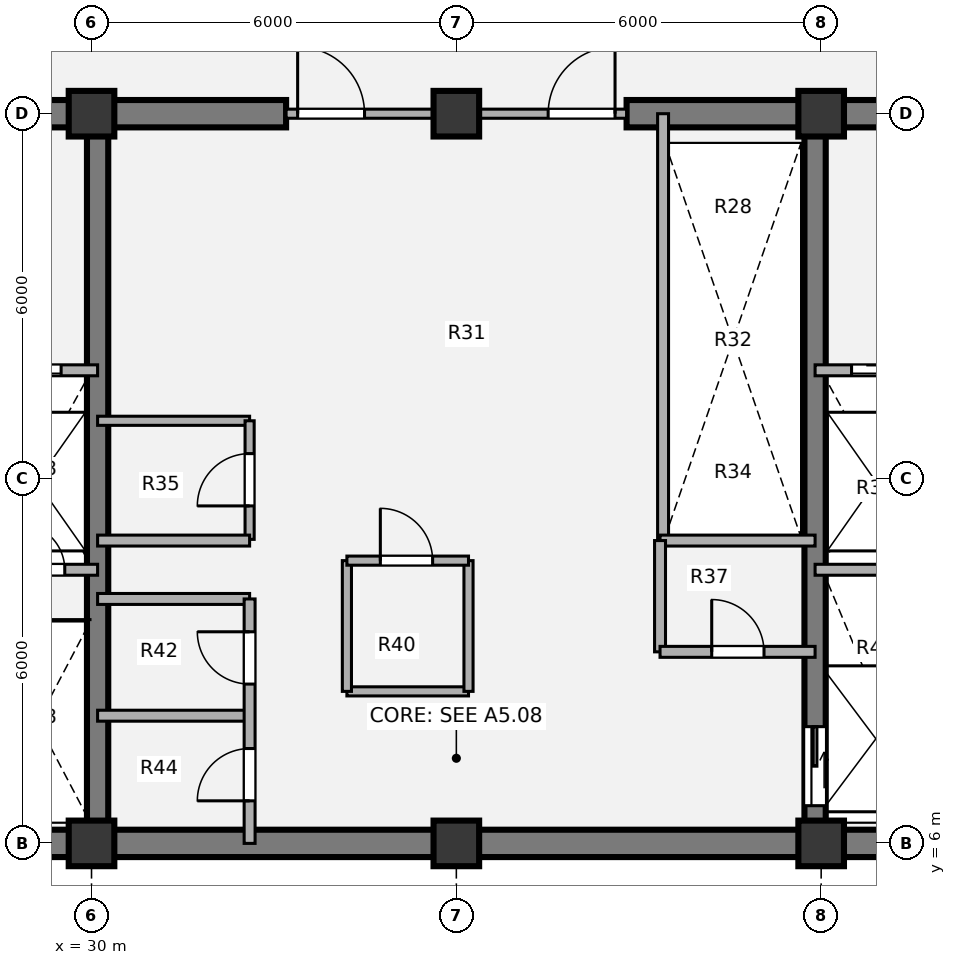
"""IFC4 building model, lengths in metres.
Left out: names, types, materials, properties, quantities, classifications, styles, units other than length and angle.
Written with IfcOpenShell. Run it as: python <this file> out.ifc"""

import sys

from ifc_helpers import new_model, si_unit, direction, frame, frame_2d, origin, origin_2d, place, context, subcontext, project, spatial, rectangle, extrude, source, transform, mapped, element, fill, save


model = new_model("IFC4")
c1 = context("Model", 3, precision=1e-05, world=origin(), true_north=direction((0.0, 1.0)))
c2 = subcontext(c1, "Body", "Model", "MODEL_VIEW")
j1 = project(units=[si_unit("LENGTHUNIT", "METRE"), si_unit("PLANEANGLEUNIT", "RADIAN")], contexts=[c1])
p1 = place(None, origin())
s1 = spatial("IfcSite", under=j1, at=p1, CompositionType="ELEMENT")
p2 = place(p1, origin())
s2 = spatial("IfcBuilding", under=s1, at=p2, CompositionType="ELEMENT")
p3 = place(p2, frame((0.0, 0.0, 171.54)))
s3 = spatial("IfcBuildingStorey", under=s2, at=p3, CompositionType="ELEMENT", Elevation=171.54)
m1 = source(origin(), c2, "Body", "SweptSolid", [
    extrude(rectangle(XDim=0.75, YDim=0.75, at=origin_2d()), origin(), (0.0, 0.0, 1.0), 3.78),
])
for number, where, z_axis, x_axis in (
    (1, (30.0, 6.0, 0.0), (0.0, 0.0, 1.0), (1.0, 0.0, 0.0)),
    (2, (36.0, 6.0, 0.0), (0.0, 0.0, 1.0), (1.0, 0.0, 0.0)),
    (3, (42.0, 6.0, 0.0), (0.0, 0.0, 1.0), (1.0, 0.0, 0.0)),
    (4, (30.0, 18.0, 0.0), (0.0, 0.0, 1.0), (1.0, 0.0, 0.0)),
    (5, (36.0, 18.0, 0.0), (0.0, 0.0, 1.0), (1.0, 0.0, 0.0)),
    (6, (42.0, 18.0, 0.0), (0.0, 0.0, 1.0), (1.0, 0.0, 0.0)),
):
    element("IfcColumn", number, at=place(p3, frame(where, z_axis=z_axis, x_axis=x_axis)), inside=s3, PredefinedType="COLUMN", context=c2, shape_type="MappedRepresentation", body=[
        mapped(m1, transform((0.0, 0.0, 0.0), x_axis=(1.0, 0.0, 0.0), y_axis=(0.0, 1.0, 0.0), z_axis=(0.0, 0.0, 1.0), scale=1.0)),
    ])
p4 = place(p3, frame((48.225, 6.0, 0.0), z_axis=(0.0, 0.0, 1.0), x_axis=(-1.0, 0.0, 0.0)))
e7 = element("IfcWall", 7, at=p4, inside=s3, PredefinedType="SHEAR", context=c2, shape_type="SweptSolid", body=[
    extrude(rectangle(XDim=24.45, YDim=0.45, at=frame_2d((12.225, 0.0))), origin(), (0.0, 0.0, 1.0), 3.78),
])
p5 = place(p3, frame((23.775, 18.0, 0.0), z_axis=(0.0, 0.0, 1.0), x_axis=(1.0, 0.0, 0.0)))
e8 = element("IfcWall", 8, at=p5, inside=s3, PredefinedType="SHEAR", context=c2, shape_type="SweptSolid", body=[
    extrude(rectangle(XDim=9.425, YDim=0.45, at=frame_2d((4.712, 0.0))), origin(), (0.0, 0.0, 1.0), 3.78),
])
p6 = place(p5, frame((2.95, 0.0, 0.0)))
e9 = element("IfcOpeningElement", 9, at=p6, cuts=e8, PredefinedType="OPENING", context=c2, shape_type="SweptSolid", body=[
    extrude(rectangle(XDim=1.1, YDim=2.1, at=origin_2d()), frame((0.55, 0.235, 1.05), z_axis=(0.0, -1.0, 0.0), x_axis=(1.0, 0.0, 0.0)), (0.0, 0.0, 1.0), 0.47),
])
p7 = place(p3, frame((38.8, 18.0, 0.0), z_axis=(0.0, 0.0, 1.0), x_axis=(1.0, 0.0, 0.0)))
e10 = element("IfcWall", 10, at=p7, inside=s3, PredefinedType="SHEAR", context=c2, shape_type="SweptSolid", body=[
    extrude(rectangle(XDim=9.425, YDim=0.45, at=frame_2d((4.712, 0.0))), origin(), (0.0, 0.0, 1.0), 3.78),
])
p8 = place(p7, frame((5.45, 0.0, 0.0)))
e11 = element("IfcOpeningElement", 11, at=p8, cuts=e10, PredefinedType="OPENING", context=c2, shape_type="SweptSolid", body=[
    extrude(rectangle(XDim=1.1, YDim=2.1, at=origin_2d()), frame((0.55, 0.235, 1.05), z_axis=(0.0, -1.0, 0.0), x_axis=(1.0, 0.0, 0.0)), (0.0, 0.0, 1.0), 0.47),
])
p9 = place(p3, frame((30.1, 6.0, 0.0), z_axis=(0.0, 0.0, 1.0), x_axis=(0.0, 1.0, 0.0)))
e12 = element("IfcWall", 12, at=p9, inside=s3, PredefinedType="SHEAR", context=c2, shape_type="SweptSolid", body=[
    extrude(rectangle(XDim=12.0, YDim=0.35, at=frame_2d((6.0, 0.0))), origin(), (0.0, 0.0, 1.0), 3.78),
])
p10 = place(p3, frame((41.9, 18.0, 0.0), z_axis=(0.0, 0.0, 1.0), x_axis=(0.0, -1.0, 0.0)))
e13 = element("IfcWall", 13, at=p10, inside=s3, PredefinedType="SHEAR", context=c2, shape_type="SweptSolid", body=[
    extrude(rectangle(XDim=12.0, YDim=0.35, at=frame_2d((6.0, 0.0))), origin(), (0.0, 0.0, 1.0), 3.78),
])
p11 = place(p10, frame((10.08, 0.0, 0.0)))
e14 = element("IfcOpeningElement", 14, at=p11, cuts=e13, PredefinedType="OPENING", context=c2, shape_type="SweptSolid", body=[
    extrude(rectangle(XDim=1.3, YDim=2.1, at=origin_2d()), frame((0.65, 0.185, 1.05), z_axis=(0.0, -1.0, 0.0), x_axis=(1.0, 0.0, 0.0)), (0.0, 0.0, 1.0), 0.37),
])
p12 = place(p3, frame((30.1, 12.95, 0.0), z_axis=(0.0, 0.0, 1.0), x_axis=(1.0, 0.0, 0.0)))
e15 = element("IfcWall", 15, at=p12, inside=s3, PredefinedType="PARTITIONING", context=c2, shape_type="SweptSolid", body=[
    extrude(rectangle(XDim=2.5, YDim=0.15, at=frame_2d((1.25, 0.0))), origin(), (0.0, 0.0, 1.0), 3.5),
])
p13 = place(p3, frame((32.6, 11.0, 0.0), z_axis=(0.0, 0.0, 1.0), x_axis=(0.0, 1.0, 0.0)))
e16 = element("IfcWall", 16, at=p13, inside=s3, PredefinedType="PARTITIONING", context=c2, shape_type="SweptSolid", body=[
    extrude(rectangle(XDim=1.95, YDim=0.15, at=frame_2d((0.975, 0.0))), origin(), (0.0, 0.0, 1.0), 3.5),
])
p14 = place(p13, frame((0.55, 0.0, 0.0)))
e17 = element("IfcOpeningElement", 17, at=p14, cuts=e16, PredefinedType="OPENING", context=c2, shape_type="SweptSolid", body=[
    extrude(rectangle(XDim=0.86, YDim=2.1, at=origin_2d()), frame((0.43, 0.085, 1.05), z_axis=(0.0, -1.0, 0.0), x_axis=(1.0, 0.0, 0.0)), (0.0, 0.0, 1.0), 0.17),
])
p15 = place(p3, frame((34.2, 8.5, 0.0), z_axis=(0.0, 0.0, 1.0), x_axis=(1.0, 0.0, 0.0)))
e18 = element("IfcWall", 18, at=p15, inside=s3, PredefinedType="PARTITIONING", context=c2, shape_type="SweptSolid", body=[
    extrude(rectangle(XDim=2.0, YDim=0.15, at=frame_2d((1.0, 0.0))), origin(), (0.0, 0.0, 1.0), 3.5),
])
p16 = place(p3, frame((34.2, 8.5, 0.0), z_axis=(0.0, 0.0, 1.0), x_axis=(0.0, 1.0, 0.0)))
e19 = element("IfcWall", 19, at=p16, inside=s3, PredefinedType="PARTITIONING", context=c2, shape_type="SweptSolid", body=[
    extrude(rectangle(XDim=2.15, YDim=0.15, at=frame_2d((1.075, 0.0))), origin(), (0.0, 0.0, 1.0), 3.5),
])
p17 = place(p3, frame((36.2, 8.5, 0.0), z_axis=(0.0, 0.0, 1.0), x_axis=(0.0, 1.0, 0.0)))
e20 = element("IfcWall", 20, at=p17, inside=s3, PredefinedType="PARTITIONING", context=c2, shape_type="SweptSolid", body=[
    extrude(rectangle(XDim=2.15, YDim=0.15, at=frame_2d((1.075, 0.0))), origin(), (0.0, 0.0, 1.0), 2.715),
])
p18 = place(p3, frame((34.2, 10.65, 0.0), z_axis=(0.0, 0.0, 1.0), x_axis=(1.0, 0.0, 0.0)))
e21 = element("IfcWall", 21, at=p18, inside=s3, PredefinedType="PARTITIONING", context=c2, shape_type="SweptSolid", body=[
    extrude(rectangle(XDim=2.0, YDim=0.15, at=frame_2d((1.0, 0.0))), origin(), (0.0, 0.0, 1.0), 3.5),
])
p19 = place(p18, frame((0.55, 0.0, 0.0)))
e22 = element("IfcOpeningElement", 22, at=p19, cuts=e21, PredefinedType="OPENING", context=c2, shape_type="SweptSolid", body=[
    extrude(rectangle(XDim=0.86, YDim=2.1, at=origin_2d()), frame((0.43, 0.085, 1.05), z_axis=(0.0, -1.0, 0.0), x_axis=(1.0, 0.0, 0.0)), (0.0, 0.0, 1.0), 0.17),
])
p20 = place(p3, frame((39.4, 11.0, 0.0), z_axis=(0.0, 0.0, 1.0), x_axis=(0.0, 1.0, 0.0)))
e23 = element("IfcWall", 23, at=p20, inside=s3, PredefinedType="PARTITIONING", context=c2, shape_type="SweptSolid", body=[
    extrude(rectangle(XDim=7.0, YDim=0.18, at=frame_2d((3.5, 0.0))), origin(), (0.0, 0.0, 1.0), 3.5),
])
p21 = place(p3, frame((30.1, 10.98, 0.0), z_axis=(0.0, 0.0, 1.0), x_axis=(1.0, 0.0, 0.0)))
e24 = element("IfcWall", 24, at=p21, inside=s3, PredefinedType="PARTITIONING", context=c2, shape_type="SweptSolid", body=[
    extrude(rectangle(XDim=2.5, YDim=0.18, at=frame_2d((1.25, 0.0))), origin(), (0.0, 0.0, 1.0), 3.5),
])
p22 = place(p3, frame((39.35, 10.98, 0.0), z_axis=(0.0, 0.0, 1.0), x_axis=(1.0, 0.0, 0.0)))
e25 = element("IfcWall", 25, at=p22, inside=s3, PredefinedType="PARTITIONING", context=c2, shape_type="SweptSolid", body=[
    extrude(rectangle(XDim=2.55, YDim=0.18, at=frame_2d((1.275, 0.0))), origin(), (0.0, 0.0, 1.0), 3.5),
])
for number, where, z_axis, x_axis in (
    (26, (30.1, 8.1, 0.0), (0.0, 0.0, 1.0), (1.0, 0.0, 0.0)),
    (27, (30.1, 10.02, 0.0), (0.0, 0.0, 1.0), (1.0, 0.0, 0.0)),
):
    element("IfcWall", number, at=place(p3, frame(where, z_axis=z_axis, x_axis=x_axis)), inside=s3, PredefinedType="PARTITIONING", context=c2, shape_type="SweptSolid", body=[
        extrude(rectangle(XDim=2.5, YDim=0.18, at=frame_2d((1.25, 0.0))), origin(), (0.0, 0.0, 1.0), 3.5),
    ])
p23 = place(p3, frame((32.6, 6.0, 0.0), z_axis=(0.0, 0.0, 1.0), x_axis=(0.0, 1.0, 0.0)))
e28 = element("IfcWall", 28, at=p23, inside=s3, PredefinedType="PARTITIONING", context=c2, shape_type="SweptSolid", body=[
    extrude(rectangle(XDim=4.02, YDim=0.18, at=frame_2d((2.01, 0.0))), origin(), (0.0, 0.0, 1.0), 3.5),
])
p24 = place(p23, frame((0.7, 0.0, 0.0)))
e29 = element("IfcOpeningElement", 29, at=p24, cuts=e28, PredefinedType="OPENING", context=c2, shape_type="SweptSolid", body=[
    extrude(rectangle(XDim=0.86, YDim=2.1, at=origin_2d()), frame((0.43, 0.1, 1.05), z_axis=(0.0, -1.0, 0.0), x_axis=(1.0, 0.0, 0.0)), (0.0, 0.0, 1.0), 0.2),
])
p25 = place(p23, frame((2.62, 0.0, 0.0)))
e30 = element("IfcOpeningElement", 30, at=p25, cuts=e28, PredefinedType="OPENING", context=c2, shape_type="SweptSolid", body=[
    extrude(rectangle(XDim=0.86, YDim=2.1, at=origin_2d()), frame((0.43, 0.1, 1.05), z_axis=(0.0, -1.0, 0.0), x_axis=(1.0, 0.0, 0.0)), (0.0, 0.0, 1.0), 0.2),
])
p26 = place(p3, frame((39.35, 9.15, 0.0), z_axis=(0.0, 0.0, 1.0), x_axis=(0.0, 1.0, 0.0)))
e31 = element("IfcWall", 31, at=p26, inside=s3, PredefinedType="PARTITIONING", context=c2, shape_type="SweptSolid", body=[
    extrude(rectangle(XDim=1.83, YDim=0.18, at=frame_2d((0.915, 0.0))), origin(), (0.0, 0.0, 1.0), 3.5),
])
p27 = place(p3, frame((39.35, 9.15, 0.0), z_axis=(0.0, 0.0, 1.0), x_axis=(1.0, 0.0, 0.0)))
e32 = element("IfcWall", 32, at=p27, inside=s3, PredefinedType="PARTITIONING", context=c2, shape_type="SweptSolid", body=[
    extrude(rectangle(XDim=2.55, YDim=0.18, at=frame_2d((1.275, 0.0))), origin(), (0.0, 0.0, 1.0), 3.5),
])
p28 = place(p27, frame((0.85, 0.0, 0.0)))
e33 = element("IfcOpeningElement", 33, at=p28, cuts=e32, PredefinedType="OPENING", context=c2, shape_type="SweptSolid", body=[
    extrude(rectangle(XDim=0.86, YDim=2.1, at=origin_2d()), frame((0.43, 0.1, 1.05), z_axis=(0.0, -1.0, 0.0), x_axis=(1.0, 0.0, 0.0)), (0.0, 0.0, 1.0), 0.2),
])
p29 = place(p3, frame((33.2, 18.0, 0.0), z_axis=(0.0, 0.0, 1.0), x_axis=(1.0, 0.0, 0.0)))
e34 = element("IfcWall", 34, at=p29, inside=s3, PredefinedType="PARTITIONING", context=c2, shape_type="SweptSolid", body=[
    extrude(rectangle(XDim=5.6, YDim=0.15, at=frame_2d((2.8, 0.0))), origin(), (0.0, 0.0, 1.0), 2.515),
])
p30 = place(p29, frame((0.19, 0.0, 0.0)))
e35 = element("IfcOpeningElement", 35, at=p30, cuts=e34, PredefinedType="OPENING", context=c2, shape_type="SweptSolid", body=[
    extrude(rectangle(XDim=1.1, YDim=2.1, at=origin_2d()), frame((0.55, 0.085, 1.05), z_axis=(0.0, -1.0, 0.0), x_axis=(1.0, 0.0, 0.0)), (0.0, 0.0, 1.0), 0.17),
])
p31 = place(p29, frame((4.31, 0.0, 0.0)))
e36 = element("IfcOpeningElement", 36, at=p31, cuts=e34, PredefinedType="OPENING", context=c2, shape_type="SweptSolid", body=[
    extrude(rectangle(XDim=1.1, YDim=2.1, at=origin_2d()), frame((0.55, 0.085, 1.05), z_axis=(0.0, -1.0, 0.0), x_axis=(1.0, 0.0, 0.0)), (0.0, 0.0, 1.0), 0.17),
])
p32 = place(p3, frame((24.0, 13.78, 0.0), z_axis=(0.0, 0.0, 1.0), x_axis=(1.0, 0.0, 0.0)))
e37 = element("IfcWall", 37, at=p32, inside=s3, PredefinedType="PARTITIONING", context=c2, shape_type="SweptSolid", body=[
    extrude(rectangle(XDim=6.1, YDim=0.18, at=frame_2d((3.05, 0.0))), origin(), (0.0, 0.0, 1.0), 3.5),
])
p33 = place(p32, frame((1.15, 0.0, 0.0)))
e38 = element("IfcOpeningElement", 38, at=p33, cuts=e37, PredefinedType="OPENING", context=c2, shape_type="SweptSolid", body=[
    extrude(rectangle(XDim=1.1, YDim=2.1, at=origin_2d()), frame((0.55, 0.1, 1.05), z_axis=(0.0, -1.0, 0.0), x_axis=(1.0, 0.0, 0.0)), (0.0, 0.0, 1.0), 0.2),
])
p34 = place(p32, frame((4.4, 0.0, 0.0)))
e39 = element("IfcOpeningElement", 39, at=p34, cuts=e37, PredefinedType="OPENING", context=c2, shape_type="SweptSolid", body=[
    extrude(rectangle(XDim=1.1, YDim=2.1, at=origin_2d()), frame((0.55, 0.1, 1.05), z_axis=(0.0, -1.0, 0.0), x_axis=(1.0, 0.0, 0.0)), (0.0, 0.0, 1.0), 0.2),
])
p35 = place(p3, frame((28.15, 10.5, 0.0), z_axis=(0.0, 0.0, 1.0), x_axis=(1.0, 0.0, 0.0)))
e40 = element("IfcWall", 40, at=p35, inside=s3, PredefinedType="PARTITIONING", context=c2, shape_type="SweptSolid", body=[
    extrude(rectangle(XDim=1.95, YDim=0.18, at=frame_2d((0.975, 0.0))), origin(), (0.0, 0.0, 1.0), 3.5),
])
p36 = place(p35, frame((0.65, 0.0, 0.0)))
e41 = element("IfcOpeningElement", 41, at=p36, cuts=e40, PredefinedType="OPENING", context=c2, shape_type="SweptSolid", body=[
    extrude(rectangle(XDim=0.76, YDim=2.05, at=origin_2d()), frame((0.38, 0.1, 1.025), z_axis=(0.0, -1.0, 0.0), x_axis=(1.0, 0.0, 0.0)), (0.0, 0.0, 1.0), 0.2),
])
p37 = place(p3, frame((41.9, 13.78, 0.0), z_axis=(0.0, 0.0, 1.0), x_axis=(1.0, 0.0, 0.0)))
e42 = element("IfcWall", 42, at=p37, inside=s3, PredefinedType="PARTITIONING", context=c2, shape_type="SweptSolid", body=[
    extrude(rectangle(XDim=6.1, YDim=0.18, at=frame_2d((3.05, 0.0))), origin(), (0.0, 0.0, 1.0), 3.5),
])
p38 = place(p37, frame((0.6, 0.0, 0.0)))
e43 = element("IfcOpeningElement", 43, at=p38, cuts=e42, PredefinedType="OPENING", context=c2, shape_type="SweptSolid", body=[
    extrude(rectangle(XDim=1.1, YDim=2.1, at=origin_2d()), frame((0.55, 0.1, 1.05), z_axis=(0.0, -1.0, 0.0), x_axis=(1.0, 0.0, 0.0)), (0.0, 0.0, 1.0), 0.2),
])
p39 = place(p37, frame((3.8, 0.0, 0.0)))
e44 = element("IfcOpeningElement", 44, at=p39, cuts=e42, PredefinedType="OPENING", context=c2, shape_type="SweptSolid", body=[
    extrude(rectangle(XDim=1.1, YDim=2.1, at=origin_2d()), frame((0.55, 0.1, 1.05), z_axis=(0.0, -1.0, 0.0), x_axis=(1.0, 0.0, 0.0)), (0.0, 0.0, 1.0), 0.2),
])
p40 = place(p3, frame((41.9, 10.5, 0.0), z_axis=(0.0, 0.0, 1.0), x_axis=(1.0, 0.0, 0.0)))
e45 = element("IfcWall", 45, at=p40, inside=s3, PredefinedType="PARTITIONING", context=c2, shape_type="SweptSolid", body=[
    extrude(rectangle(XDim=1.95, YDim=0.18, at=frame_2d((0.975, 0.0))), origin(), (0.0, 0.0, 1.0), 3.5),
])
m2 = source(origin(), c2, "Body", "SweptSolid", [
    extrude(rectangle(XDim=0.86, YDim=2.1, at=origin_2d()), frame((0.43, 0.025, 1.05), z_axis=(0.0, -1.0, 0.0), x_axis=(1.0, 0.0, 0.0)), (0.0, 0.0, 1.0), 0.05),
])
p41 = place(p14, origin())
e46 = element("IfcDoor", 46, at=p41, inside=s3, OperationType="SINGLE_SWING_LEFT", PredefinedType="DOOR", context=c2, shape_type="MappedRepresentation", body=[
    mapped(m2, transform((0.0, 0.0, 0.0), x_axis=(1.0, 0.0, 0.0), y_axis=(0.0, 1.0, 0.0), z_axis=(0.0, 0.0, 1.0), scale=1.0)),
])
fill(e17, e46)
p42 = place(p19, origin())
e47 = element("IfcDoor", 47, at=p42, inside=s3, OperationType="SINGLE_SWING_LEFT", PredefinedType="DOOR", context=c2, shape_type="MappedRepresentation", body=[
    mapped(m2, transform((0.0, 0.0, 0.0), x_axis=(1.0, 0.0, 0.0), y_axis=(0.0, 1.0, 0.0), z_axis=(0.0, 0.0, 1.0), scale=1.0)),
])
fill(e22, e47)
p43 = place(p24, origin())
e48 = element("IfcDoor", 48, at=p43, inside=s3, OperationType="SINGLE_SWING_LEFT", PredefinedType="DOOR", context=c2, shape_type="MappedRepresentation", body=[
    mapped(m2, transform((0.0, 0.0, 0.0), x_axis=(1.0, 0.0, 0.0), y_axis=(0.0, 1.0, 0.0), z_axis=(0.0, 0.0, 1.0), scale=1.0)),
])
fill(e29, e48)
p44 = place(p25, origin())
e49 = element("IfcDoor", 49, at=p44, inside=s3, OperationType="SINGLE_SWING_RIGHT", PredefinedType="DOOR", context=c2, shape_type="MappedRepresentation", body=[
    mapped(m2, transform((0.0, 0.0, 0.0), x_axis=(1.0, 0.0, 0.0), y_axis=(0.0, 1.0, 0.0), z_axis=(0.0, 0.0, 1.0), scale=1.0)),
])
fill(e30, e49)
p45 = place(p28, origin())
e50 = element("IfcDoor", 50, at=p45, inside=s3, OperationType="SINGLE_SWING_LEFT", PredefinedType="DOOR", context=c2, shape_type="MappedRepresentation", body=[
    mapped(m2, transform((0.0, 0.0, 0.0), x_axis=(1.0, 0.0, 0.0), y_axis=(0.0, 1.0, 0.0), z_axis=(0.0, 0.0, 1.0), scale=1.0)),
])
fill(e33, e50)
m3 = source(origin(), c2, "Body", "SweptSolid", [
    extrude(rectangle(XDim=1.1, YDim=2.1, at=origin_2d()), frame((0.55, 0.025, 1.05), z_axis=(0.0, -1.0, 0.0), x_axis=(1.0, 0.0, 0.0)), (0.0, 0.0, 1.0), 0.05),
])
p46 = place(p30, origin())
e51 = element("IfcDoor", 51, at=p46, inside=s3, OperationType="SINGLE_SWING_LEFT", PredefinedType="DOOR", context=c2, shape_type="MappedRepresentation", body=[
    mapped(m3, transform((0.0, 0.0, 0.0), x_axis=(1.0, 0.0, 0.0), y_axis=(0.0, 1.0, 0.0), z_axis=(0.0, 0.0, 1.0), scale=1.0)),
])
fill(e35, e51)
p47 = place(p31, origin())
e52 = element("IfcDoor", 52, at=p47, inside=s3, OperationType="SINGLE_SWING_RIGHT", PredefinedType="DOOR", context=c2, shape_type="MappedRepresentation", body=[
    mapped(m3, transform((0.0, 0.0, 0.0), x_axis=(1.0, 0.0, 0.0), y_axis=(0.0, 1.0, 0.0), z_axis=(0.0, 0.0, 1.0), scale=1.0)),
])
fill(e36, e52)
m4 = source(origin(), c2, "Body", "SweptSolid", [
    extrude(rectangle(XDim=1.1, YDim=2.1, at=origin_2d()), frame((0.55, 0.025, 1.05), z_axis=(0.0, -1.0, 0.0), x_axis=(1.0, 0.0, 0.0)), (0.0, 0.0, 1.0), 0.05),
])
p48 = place(p34, origin())
e53 = element("IfcDoor", 53, at=p48, inside=s3, OperationType="SLIDING_TO_LEFT", PredefinedType="DOOR", context=c2, shape_type="MappedRepresentation", body=[
    mapped(m4, transform((0.0, 0.0, 0.0), x_axis=(1.0, 0.0, 0.0), y_axis=(0.0, 1.0, 0.0), z_axis=(0.0, 0.0, 1.0), scale=1.0)),
])
fill(e39, e53)
m5 = source(origin(), c2, "Body", "SweptSolid", [
    extrude(rectangle(XDim=0.76, YDim=2.05, at=origin_2d()), frame((0.38, 0.025, 1.025), z_axis=(0.0, -1.0, 0.0), x_axis=(1.0, 0.0, 0.0)), (0.0, 0.0, 1.0), 0.05),
])
p49 = place(p36, origin())
e54 = element("IfcDoor", 54, at=p49, inside=s3, OperationType="SINGLE_SWING_LEFT", PredefinedType="DOOR", context=c2, shape_type="MappedRepresentation", body=[
    mapped(m5, transform((0.0, 0.0, 0.0), x_axis=(1.0, 0.0, 0.0), y_axis=(0.0, 1.0, 0.0), z_axis=(0.0, 0.0, 1.0), scale=1.0)),
])
fill(e41, e54)
p50 = place(p38, origin())
e55 = element("IfcDoor", 55, at=p50, inside=s3, OperationType="SLIDING_TO_RIGHT", PredefinedType="DOOR", context=c2, shape_type="MappedRepresentation", body=[
    mapped(m4, transform((0.0, 0.0, 0.0), x_axis=(1.0, 0.0, 0.0), y_axis=(0.0, 1.0, 0.0), z_axis=(0.0, 0.0, 1.0), scale=1.0)),
])
fill(e43, e55)
m6 = source(origin(), c2, "Body", "SweptSolid", [
    extrude(rectangle(XDim=1.3, YDim=2.1, at=origin_2d()), frame((0.65, 0.025, 1.05), z_axis=(0.0, -1.0, 0.0), x_axis=(1.0, 0.0, 0.0)), (0.0, 0.0, 1.0), 0.05),
])
p51 = place(p11, origin())
e56 = element("IfcDoor", 56, at=p51, inside=s3, OperationType="SLIDING_TO_LEFT", PredefinedType="DOOR", context=c2, shape_type="MappedRepresentation", body=[
    mapped(m6, transform((0.0, 0.0, 0.0), x_axis=(1.0, 0.0, 0.0), y_axis=(0.0, 1.0, 0.0), z_axis=(0.0, 0.0, 1.0), scale=1.0)),
])
fill(e14, e56)
save(model, sys.argv[1])
